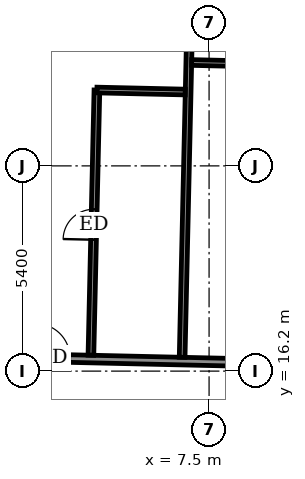
"""IFC4 building model, lengths in metres.
Left out: names, types, materials, properties, quantities, classifications, styles, units other than length and angle.
Written with IfcOpenShell. Run it as: python <this file> out.ifc"""

import sys

from ifc_helpers import new_model, si_unit, direction, frame, frame_2d, origin, place, context, subcontext, project, spatial, rectangle, extrude, element, fill, save


model = new_model("IFC4")
c1 = context("Model", 3, precision=1e-05, world=origin(), true_north=direction((0.0, 1.0)))
c2 = subcontext(c1, "Body", "Model", "MODEL_VIEW")
j1 = project(units=[si_unit("LENGTHUNIT", "METRE"), si_unit("PLANEANGLEUNIT", "RADIAN")], contexts=[c1])
p1 = place(None, origin())
s1 = spatial("IfcSite", under=j1, at=p1, CompositionType="ELEMENT")
p2 = place(p1, origin())
s2 = spatial("IfcBuilding", under=s1, at=p2, CompositionType="ELEMENT")
p3 = place(p2, frame((0.0, 0.0, 309.7)))
s3 = spatial("IfcBuildingStorey", under=s2, at=p3, CompositionType="ELEMENT", Elevation=309.7)
p4 = place(p3, frame((-30.652, 17.313, 0.0), z_axis=(0.0, 0.0, 1.0), x_axis=(0.999742623764, -0.02268669719, 0.0)))
e1 = element("IfcWall", 1, at=p4, inside=s3, PredefinedType="PARTITIONING", context=c2, shape_type="SweptSolid", body=[
    extrude(rectangle(XDim=58.8, YDim=0.2, at=frame_2d((29.4, 0.0))), origin(), (0.0, 0.0, 1.0), 3.05),
])
p5 = place(p4, frame((54.601, 0.0, 0.0)))
e2 = element("IfcOpeningElement", 2, at=p5, cuts=e1, PredefinedType="OPENING", context=c2, shape_type="SweptSolid", body=[
    extrude(rectangle(XDim=1.0, YDim=2.1, at=frame_2d((0.5, 1.05))), frame((0.0, 0.11, 0.0), z_axis=(0.0, -1.0, 0.0), x_axis=(1.0, 0.0, 0.0)), (0.0, 0.0, 1.0), 0.22),
])
p6 = place(p4, frame((49.35, 0.0, 0.0)))
e3 = element("IfcOpeningElement", 3, at=p6, cuts=e1, PredefinedType="OPENING", context=c2, shape_type="SweptSolid", body=[
    extrude(rectangle(XDim=0.9, YDim=2.1, at=frame_2d((0.45, 1.05))), frame((0.0, 0.11, 0.0), z_axis=(0.0, -1.0, 0.0), x_axis=(1.0, 0.0, 0.0)), (0.0, 0.0, 1.0), 0.22),
])
p7 = place(p4, frame((42.55, 0.0, 0.0)))
e4 = element("IfcOpeningElement", 4, at=p7, cuts=e1, PredefinedType="OPENING", context=c2, shape_type="SweptSolid", body=[
    extrude(rectangle(XDim=0.9, YDim=2.1, at=frame_2d((0.45, 1.05))), frame((0.0, 0.11, 0.0), z_axis=(0.0, -1.0, 0.0), x_axis=(1.0, 0.0, 0.0)), (0.0, 0.0, 1.0), 0.22),
])
p8 = place(p4, frame((40.475, 0.0, 0.0)))
e5 = element("IfcOpeningElement", 5, at=p8, cuts=e1, PredefinedType="OPENING", context=c2, shape_type="SweptSolid", body=[
    extrude(rectangle(XDim=0.9, YDim=2.1, at=frame_2d((0.45, 1.05))), frame((0.0, 0.11, 0.0), z_axis=(0.0, -1.0, 0.0), x_axis=(1.0, 0.0, 0.0)), (0.0, 0.0, 1.0), 0.22),
])
p9 = place(p4, frame((33.6, 0.0, 0.0)))
e6 = element("IfcOpeningElement", 6, at=p9, cuts=e1, PredefinedType="OPENING", context=c2, shape_type="SweptSolid", body=[
    extrude(rectangle(XDim=0.9, YDim=2.1, at=frame_2d((0.45, 1.05))), frame((0.0, 0.11, 0.0), z_axis=(0.0, -1.0, 0.0), x_axis=(1.0, 0.0, 0.0)), (0.0, 0.0, 1.0), 0.22),
])
p10 = place(p4, frame((31.55, 0.0, 0.0)))
e7 = element("IfcOpeningElement", 7, at=p10, cuts=e1, PredefinedType="OPENING", context=c2, shape_type="SweptSolid", body=[
    extrude(rectangle(XDim=0.9, YDim=2.1, at=frame_2d((0.45, 1.05))), frame((0.0, 0.11, 0.0), z_axis=(0.0, -1.0, 0.0), x_axis=(1.0, 0.0, 0.0)), (0.0, 0.0, 1.0), 0.22),
])
p11 = place(p4, frame((24.425, 0.0, 0.0)))
e8 = element("IfcOpeningElement", 8, at=p11, cuts=e1, PredefinedType="OPENING", context=c2, shape_type="SweptSolid", body=[
    extrude(rectangle(XDim=0.9, YDim=2.1, at=frame_2d((0.45, 1.05))), frame((0.0, 0.11, 0.0), z_axis=(0.0, -1.0, 0.0), x_axis=(1.0, 0.0, 0.0)), (0.0, 0.0, 1.0), 0.22),
])
p12 = place(p4, frame((22.05, 0.0, 0.0)))
e9 = element("IfcOpeningElement", 9, at=p12, cuts=e1, PredefinedType="OPENING", context=c2, shape_type="SweptSolid", body=[
    extrude(rectangle(XDim=0.9, YDim=2.1, at=frame_2d((0.45, 1.05))), frame((0.0, 0.11, 0.0), z_axis=(0.0, -1.0, 0.0), x_axis=(1.0, 0.0, 0.0)), (0.0, 0.0, 1.0), 0.22),
])
p13 = place(p4, frame((14.95, 0.0, 0.0)))
e10 = element("IfcOpeningElement", 10, at=p13, cuts=e1, PredefinedType="OPENING", context=c2, shape_type="SweptSolid", body=[
    extrude(rectangle(XDim=0.9, YDim=2.1, at=frame_2d((0.45, 1.05))), frame((0.0, 0.11, 0.0), z_axis=(0.0, -1.0, 0.0), x_axis=(1.0, 0.0, 0.0)), (0.0, 0.0, 1.0), 0.22),
])
p14 = place(p4, frame((12.525, 0.0, 0.0)))
e11 = element("IfcOpeningElement", 11, at=p14, cuts=e1, PredefinedType="OPENING", context=c2, shape_type="SweptSolid", body=[
    extrude(rectangle(XDim=0.9, YDim=2.1, at=frame_2d((0.45, 1.05))), frame((0.0, 0.11, 0.0), z_axis=(0.0, -1.0, 0.0), x_axis=(1.0, 0.0, 0.0)), (0.0, 0.0, 1.0), 0.22),
])
p15 = place(p4, frame((4.032, 0.0, 0.0)))
e12 = element("IfcOpeningElement", 12, at=p15, cuts=e1, PredefinedType="OPENING", context=c2, shape_type="SweptSolid", body=[
    extrude(rectangle(XDim=1.0, YDim=2.1, at=frame_2d((0.5, 1.05))), frame((0.0, 0.11, 0.0), z_axis=(0.0, -1.0, 0.0), x_axis=(1.0, 0.0, 0.0)), (0.0, 0.0, 1.0), 0.22),
])
p16 = place(p3, frame((4.391, 16.618, 0.0), z_axis=(0.0, 0.0, 1.0), x_axis=(0.022630826984, 0.999743890039, 0.0)))
e13 = element("IfcWall", 13, at=p16, inside=s3, PredefinedType="PARTITIONING", context=c2, shape_type="SweptSolid", body=[
    extrude(rectangle(XDim=6.98, YDim=0.15, at=frame_2d((3.49, 0.0))), origin(), (0.0, 0.0, 1.0), 3.05),
])
p17 = place(p16, frame((3.04, 0.0, 0.0)))
e14 = element("IfcOpeningElement", 14, at=p17, cuts=e13, PredefinedType="OPENING", context=c2, shape_type="SweptSolid", body=[
    extrude(rectangle(XDim=0.8, YDim=2.1, at=frame_2d((0.4, 1.05))), frame((0.0, 0.085, 0.0), z_axis=(0.0, -1.0, 0.0), x_axis=(1.0, 0.0, 0.0)), (0.0, 0.0, 1.0), 0.17),
])
p18 = place(p3, frame((6.791, 16.563, 0.0), z_axis=(0.0, 0.0, 1.0), x_axis=(0.022661475803, 0.999743195783, 0.0)))
e15 = element("IfcWall", 15, at=p18, inside=s3, PredefinedType="PARTITIONING", context=c2, shape_type="SweptSolid", body=[
    extrude(rectangle(XDim=12.4, YDim=0.15, at=frame_2d((6.2, 0.0))), origin(), (0.0, 0.0, 1.0), 2.5),
])
p19 = place(p3, frame((4.549, 23.596, 0.0), z_axis=(0.0, 0.0, 1.0), x_axis=(0.999740478815, -0.022781023197, 0.0)))
e16 = element("IfcWall", 16, at=p19, inside=s3, PredefinedType="PARTITIONING", context=c2, shape_type="SweptSolid", body=[
    extrude(rectangle(XDim=2.325, YDim=0.15, at=frame_2d((1.163, 0.0))), origin(), (0.0, 0.0, 1.0), 3.05),
])
p20 = place(p3, frame((7.042, 24.32, 0.0), z_axis=(0.0, 0.0, 1.0), x_axis=(0.999740260747, -0.02279059109, 0.0)))
e17 = element("IfcWall", 17, at=p20, inside=s3, PredefinedType="PARTITIONING", context=c2, shape_type="SweptSolid", body=[
    extrude(rectangle(XDim=2.324, YDim=0.15, at=frame_2d((1.162, 0.0))), origin(), (0.0, 0.0, 1.0), 3.05),
])
p21 = place(p9, origin())
e18 = element("IfcDoor", 18, at=p21, inside=s3, OperationType="SINGLE_SWING_RIGHT", PredefinedType="DOOR", context=c2, shape_type="SweptSolid", body=[
    extrude(rectangle(XDim=0.9, YDim=2.1, at=frame_2d((0.45, 1.05))), frame((0.0, 0.025, 0.0), z_axis=(0.0, -1.0, 0.0), x_axis=(1.0, 0.0, 0.0)), (0.0, 0.0, 1.0), 0.05),
])
fill(e6, e18)
p22 = place(p17, origin())
e19 = element("IfcDoor", 19, at=p22, inside=s3, OperationType="SINGLE_SWING_RIGHT", PredefinedType="DOOR", context=c2, shape_type="SweptSolid", body=[
    extrude(rectangle(XDim=0.8, YDim=2.1, at=frame_2d((0.4, 1.05))), frame((0.0, 0.025, 0.0), z_axis=(0.0, -1.0, 0.0), x_axis=(1.0, 0.0, 0.0)), (0.0, 0.0, 1.0), 0.05),
])
fill(e14, e19)
save(model, sys.argv[1])
